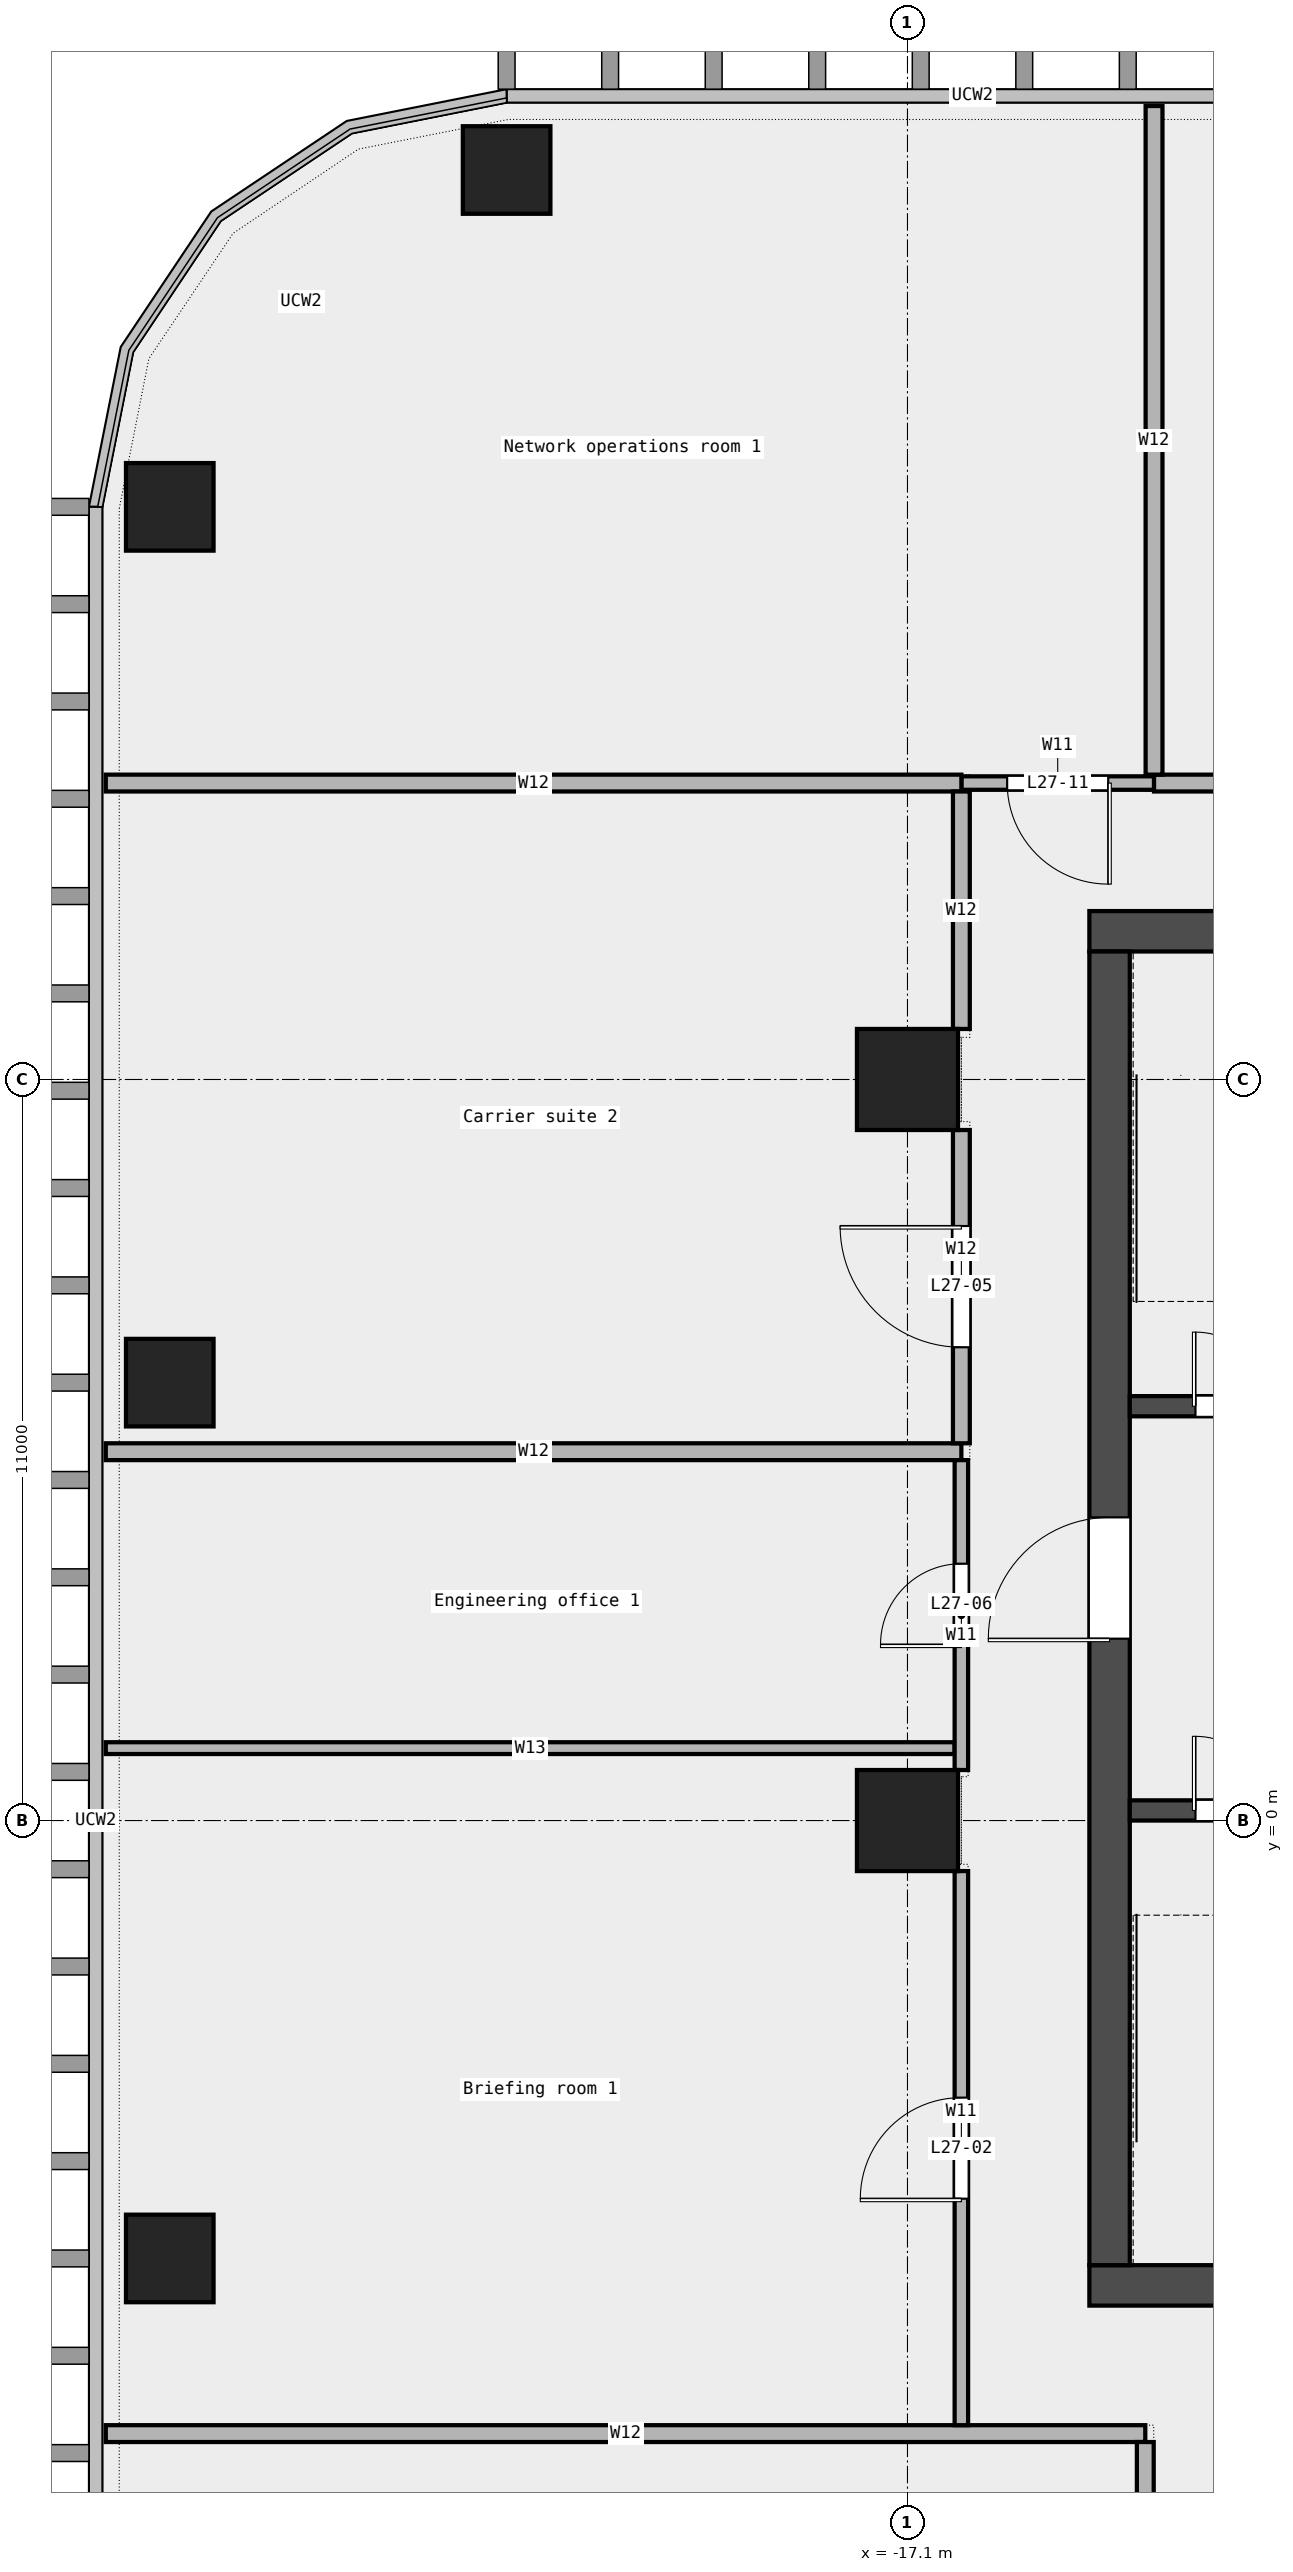
"""IFC4 building model, lengths in metres.
Left out: names, types, materials, properties, quantities, classifications, styles, units other than length and angle.
Written with IfcOpenShell. Run it as: python <this file> out.ifc"""

import sys

from ifc_helpers import new_model, si_unit, direction, frame, frame_2d, origin, origin_2d, place, context, subcontext, project, spatial, rectangle, extrude, element, fill, save


model = new_model("IFC4")
c1 = context("Model", 3, precision=1e-05, world=origin(), true_north=direction((0.0, 1.0)))
c2 = subcontext(c1, "Body", "Model", "MODEL_VIEW")
j1 = project(units=[si_unit("LENGTHUNIT", "METRE"), si_unit("PLANEANGLEUNIT", "RADIAN")], contexts=[c1])
p1 = place(None, origin())
s1 = spatial("IfcSite", under=j1, at=p1, CompositionType="ELEMENT")
p2 = place(p1, origin())
s2 = spatial("IfcBuilding", under=s1, at=p2, CompositionType="ELEMENT")
p3 = place(p2, frame((0.0, 0.0, 135.1)))
s3 = spatial("IfcBuildingStorey", under=s2, at=p3, CompositionType="ELEMENT", Elevation=135.1)
for number, where, z_axis, x_axis in (
    (1, (-23.05, 24.5, 0.0), (0.0, 0.0, 1.0), (1.0, 0.0, 0.0)),
    (2, (-28.05, 19.5, 0.0), (0.0, 0.0, 1.0), (1.0, 0.0, 0.0)),
    (3, (-28.05, 6.5, 0.0), (0.0, 0.0, 1.0), (1.0, 0.0, 0.0)),
    (4, (-28.05, -6.5, 0.0), (0.0, 0.0, 1.0), (1.0, 0.0, 0.0)),
):
    element("IfcColumn", number, at=place(p3, frame(where, z_axis=z_axis, x_axis=x_axis)), inside=s3, PredefinedType="COLUMN", context=c2, shape_type="SweptSolid", body=[
        extrude(rectangle(XDim=1.3, YDim=1.3, at=origin_2d()), origin(), (0.0, 0.0, 1.0), 4.05),
    ])
for number, where, z_axis, x_axis in (
    (5, (-17.1, 0.0, 0.0), (0.0, 0.0, 1.0), (1.0, 0.0, 0.0)),
    (6, (-17.1, 11.0, 0.0), (0.0, 0.0, 1.0), (1.0, 0.0, 0.0)),
):
    element("IfcColumn", number, at=place(p3, frame(where, z_axis=z_axis, x_axis=x_axis)), inside=s3, PredefinedType="COLUMN", context=c2, shape_type="SweptSolid", body=[
        extrude(rectangle(XDim=1.5, YDim=1.5, at=origin_2d()), origin(), (0.0, 0.0, 1.0), 4.05),
    ])
p4 = place(p3, frame((-29.0, -9.1, 0.0), z_axis=(0.0, 0.0, 1.0), x_axis=(1.0, 0.0, 0.0)))
e7 = element("IfcWall", 7, at=p4, inside=s3, PredefinedType="PARTITIONING", context=c2, shape_type="SweptSolid", body=[
    extrude(rectangle(XDim=15.43, YDim=0.25, at=frame_2d((7.715, 0.0))), origin(), (0.0, 0.0, 1.0), 4.05),
])
p5 = place(p3, frame((-29.0, 1.075, 0.0), z_axis=(0.0, 0.0, 1.0), x_axis=(1.0, 0.0, 0.0)))
e8 = element("IfcWall", 8, at=p5, inside=s3, PredefinedType="PARTITIONING", context=c2, shape_type="SweptSolid", body=[
    extrude(rectangle(XDim=12.6, YDim=0.175, at=frame_2d((6.3, 0.0))), origin(), (0.0, 0.0, 1.0), 4.05),
])
p6 = place(p3, frame((-29.0, 5.475, 0.0), z_axis=(0.0, 0.0, 1.0), x_axis=(1.0, 0.0, 0.0)))
e9 = element("IfcWall", 9, at=p6, inside=s3, PredefinedType="PARTITIONING", context=c2, shape_type="SweptSolid", body=[
    extrude(rectangle(XDim=12.7, YDim=0.25, at=frame_2d((6.35, 0.0))), origin(), (0.0, 0.0, 1.0), 4.05),
])
p7 = place(p3, frame((-16.3, 15.4, 0.0), z_axis=(0.0, 0.0, 1.0), x_axis=(1.0, 0.0, 0.0)))
e10 = element("IfcWall", 10, at=p7, inside=s3, PredefinedType="PARTITIONING", context=c2, shape_type="SweptSolid", body=[
    extrude(rectangle(XDim=2.86, YDim=0.2, at=frame_2d((1.43, 0.0))), origin(), (0.0, 0.0, 1.0), 4.05),
])
p8 = place(p7, frame((0.68, 0.0, 0.0)))
e11 = element("IfcOpeningElement", 11, at=p8, cuts=e10, PredefinedType="OPENING", context=c2, shape_type="SweptSolid", body=[
    extrude(rectangle(XDim=1.5, YDim=2.1, at=frame_2d((0.75, 1.05))), frame((0.0, 0.112, 0.0), z_axis=(0.0, -1.0, 0.0), x_axis=(1.0, 0.0, 0.0)), (0.0, 0.0, 1.0), 0.224),
])
p9 = place(p3, frame((-29.0, 15.4, 0.0), z_axis=(0.0, 0.0, 1.0), x_axis=(1.0, 0.0, 0.0)))
e12 = element("IfcWall", 12, at=p9, inside=s3, PredefinedType="PARTITIONING", context=c2, shape_type="SweptSolid", body=[
    extrude(rectangle(XDim=12.7, YDim=0.25, at=frame_2d((6.35, 0.0))), origin(), (0.0, 0.0, 1.0), 4.05),
])
p10 = place(p3, frame((-13.44, 15.4, 0.0), z_axis=(0.0, 0.0, 1.0), x_axis=(1.0, 0.0, 0.0)))
e13 = element("IfcWall", 13, at=p10, inside=s3, PredefinedType="PARTITIONING", context=c2, shape_type="SweptSolid", body=[
    extrude(rectangle(XDim=4.22, YDim=0.25, at=frame_2d((2.11, 0.0))), origin(), (0.0, 0.0, 1.0), 4.05),
])
p11 = place(p10, frame((1.66, 0.0, 0.0)))
e14 = element("IfcOpeningElement", 14, at=p11, cuts=e13, PredefinedType="OPENING", context=c2, shape_type="SweptSolid", body=[
    extrude(rectangle(XDim=0.9, YDim=2.1, at=frame_2d((0.45, 1.05))), frame((0.0, 0.137, 0.0), z_axis=(0.0, -1.0, 0.0), x_axis=(1.0, 0.0, 0.0)), (0.0, 0.0, 1.0), 0.274),
])
p12 = place(p3, frame((-16.3, -8.975, 0.0), z_axis=(0.0, 0.0, 1.0), x_axis=(0.0, 1.0, 0.0)))
e15 = element("IfcWall", 15, at=p12, inside=s3, PredefinedType="PARTITIONING", context=c2, shape_type="SweptSolid", body=[
    extrude(rectangle(XDim=8.225, YDim=0.2, at=frame_2d((4.113, 0.0))), origin(), (0.0, 0.0, 1.0), 4.05),
])
p13 = place(p12, frame((3.363, 0.0, 0.0)))
e16 = element("IfcOpeningElement", 16, at=p13, cuts=e15, PredefinedType="OPENING", context=c2, shape_type="SweptSolid", body=[
    extrude(rectangle(XDim=1.5, YDim=2.1, at=frame_2d((0.75, 1.05))), frame((0.0, 0.112, 0.0), z_axis=(0.0, -1.0, 0.0), x_axis=(1.0, 0.0, 0.0)), (0.0, 0.0, 1.0), 0.224),
])
p14 = place(p3, frame((-16.3, 0.75, 0.0), z_axis=(0.0, 0.0, 1.0), x_axis=(0.0, 1.0, 0.0)))
e17 = element("IfcWall", 17, at=p14, inside=s3, PredefinedType="PARTITIONING", context=c2, shape_type="SweptSolid", body=[
    extrude(rectangle(XDim=4.6, YDim=0.2, at=frame_2d((2.3, 0.0))), origin(), (0.0, 0.0, 1.0), 4.05),
])
p15 = place(p14, frame((1.863, 0.0, 0.0)))
e18 = element("IfcOpeningElement", 18, at=p15, cuts=e17, PredefinedType="OPENING", context=c2, shape_type="SweptSolid", body=[
    extrude(rectangle(XDim=1.2, YDim=2.1, at=frame_2d((0.6, 1.05))), frame((0.0, 0.112, 0.0), z_axis=(0.0, -1.0, 0.0), x_axis=(1.0, 0.0, 0.0)), (0.0, 0.0, 1.0), 0.224),
])
p16 = place(p3, frame((-16.3, 5.6, 0.0), z_axis=(0.0, 0.0, 1.0), x_axis=(0.0, 1.0, 0.0)))
e19 = element("IfcWall", 19, at=p16, inside=s3, PredefinedType="PARTITIONING", context=c2, shape_type="SweptSolid", body=[
    extrude(rectangle(XDim=4.65, YDim=0.25, at=frame_2d((2.325, 0.0))), origin(), (0.0, 0.0, 1.0), 4.05),
])
p17 = place(p16, frame((1.425, 0.0, 0.0)))
e20 = element("IfcOpeningElement", 20, at=p17, cuts=e19, PredefinedType="OPENING", context=c2, shape_type="SweptSolid", body=[
    extrude(rectangle(XDim=1.8, YDim=2.1, at=frame_2d((0.9, 1.05))), frame((0.0, 0.137, 0.0), z_axis=(0.0, -1.0, 0.0), x_axis=(1.0, 0.0, 0.0)), (0.0, 0.0, 1.0), 0.274),
])
p18 = place(p3, frame((-16.3, 11.75, 0.0), z_axis=(0.0, 0.0, 1.0), x_axis=(0.0, 1.0, 0.0)))
e21 = element("IfcWall", 21, at=p18, inside=s3, PredefinedType="PARTITIONING", context=c2, shape_type="SweptSolid", body=[
    extrude(rectangle(XDim=3.525, YDim=0.25, at=frame_2d((1.762, 0.0))), origin(), (0.0, 0.0, 1.0), 4.05),
])
p19 = place(p3, frame((-13.57, -13.825, 0.0), z_axis=(0.0, 0.0, 1.0), x_axis=(0.0, 1.0, 0.0)))
e22 = element("IfcWall", 22, at=p19, inside=s3, PredefinedType="PARTITIONING", context=c2, shape_type="SweptSolid", body=[
    extrude(rectangle(XDim=4.6, YDim=0.25, at=frame_2d((2.3, 0.0))), origin(), (0.0, 0.0, 1.0), 4.05),
])
p20 = place(p3, frame((-13.44, 15.525, 0.0), z_axis=(0.0, 0.0, 1.0), x_axis=(0.0, 1.0, 0.0)))
e23 = element("IfcWall", 23, at=p20, inside=s3, PredefinedType="PARTITIONING", context=c2, shape_type="SweptSolid", body=[
    extrude(rectangle(XDim=9.925, YDim=0.25, at=frame_2d((4.962, 0.0))), origin(), (0.0, 0.0, 1.0), 4.05),
])
p21 = place(p3, frame((-14.4, -6.9, 0.0), z_axis=(0.0, 0.0, 1.0), x_axis=(1.0, 0.0, 0.0)))
e24 = element("IfcWall", 24, at=p21, inside=s3, PredefinedType="SHEAR", context=c2, shape_type="SweptSolid", body=[
    extrude(rectangle(XDim=28.8, YDim=0.6, at=frame_2d((14.4, 0.0))), origin(), (0.0, 0.0, 1.0), 4.2),
])
p22 = place(p21, frame((4.9, 0.0, 0.0)))
e25 = element("IfcOpeningElement", 25, at=p22, cuts=e24, PredefinedType="OPENING", context=c2, shape_type="SweptSolid", body=[
    extrude(rectangle(XDim=1.0, YDim=2.1, at=frame_2d((0.5, 1.05))), frame((0.0, 0.312, 0.0), z_axis=(0.0, -1.0, 0.0), x_axis=(1.0, 0.0, 0.0)), (0.0, 0.0, 1.0), 0.624),
])
p23 = place(p21, frame((9.3, 0.0, 0.0)))
e26 = element("IfcOpeningElement", 26, at=p23, cuts=e24, PredefinedType="OPENING", context=c2, shape_type="SweptSolid", body=[
    extrude(rectangle(XDim=1.2, YDim=2.1, at=frame_2d((0.6, 1.05))), frame((0.0, 0.312, 0.0), z_axis=(0.0, -1.0, 0.0), x_axis=(1.0, 0.0, 0.0)), (0.0, 0.0, 1.0), 0.624),
])
p24 = place(p21, frame((14.462, 0.0, 0.0)))
e27 = element("IfcOpeningElement", 27, at=p24, cuts=e24, PredefinedType="OPENING", context=c2, shape_type="SweptSolid", body=[
    extrude(rectangle(XDim=1.0, YDim=2.1, at=frame_2d((0.5, 1.05))), frame((0.0, 0.312, 0.0), z_axis=(0.0, -1.0, 0.0), x_axis=(1.0, 0.0, 0.0)), (0.0, 0.0, 1.0), 0.624),
])
p25 = place(p21, frame((18.75, 0.0, 0.0)))
e28 = element("IfcOpeningElement", 28, at=p25, cuts=e24, PredefinedType="OPENING", context=c2, shape_type="SweptSolid", body=[
    extrude(rectangle(XDim=1.8, YDim=2.1, at=frame_2d((0.9, 1.05))), frame((0.0, 0.312, 0.0), z_axis=(0.0, -1.0, 0.0), x_axis=(1.0, 0.0, 0.0)), (0.0, 0.0, 1.0), 0.624),
])
p26 = place(p21, frame((23.087, 0.0, 0.0)))
e29 = element("IfcOpeningElement", 29, at=p26, cuts=e24, PredefinedType="OPENING", context=c2, shape_type="SweptSolid", body=[
    extrude(rectangle(XDim=1.0, YDim=2.1, at=frame_2d((0.5, 1.05))), frame((0.0, 0.312, 0.0), z_axis=(0.0, -1.0, 0.0), x_axis=(1.0, 0.0, 0.0)), (0.0, 0.0, 1.0), 0.624),
])
p27 = place(p3, frame((-14.4, 13.2, 0.0), z_axis=(0.0, 0.0, 1.0), x_axis=(1.0, 0.0, 0.0)))
e30 = element("IfcWall", 30, at=p27, inside=s3, PredefinedType="SHEAR", context=c2, shape_type="SweptSolid", body=[
    extrude(rectangle(XDim=28.8, YDim=0.6, at=frame_2d((14.4, 0.0))), origin(), (0.0, 0.0, 1.0), 4.2),
])
p28 = place(p27, frame((6.775, 0.0, 0.0)))
e31 = element("IfcOpeningElement", 31, at=p28, cuts=e30, PredefinedType="OPENING", context=c2, shape_type="SweptSolid", body=[
    extrude(rectangle(XDim=1.0, YDim=2.1, at=frame_2d((0.5, 1.05))), frame((0.0, 0.312, 0.0), z_axis=(0.0, -1.0, 0.0), x_axis=(1.0, 0.0, 0.0)), (0.0, 0.0, 1.0), 0.624),
])
p29 = place(p27, frame((13.525, 0.0, 0.0)))
e32 = element("IfcOpeningElement", 32, at=p29, cuts=e30, PredefinedType="OPENING", context=c2, shape_type="SweptSolid", body=[
    extrude(rectangle(XDim=1.0, YDim=2.1, at=frame_2d((0.5, 1.05))), frame((0.0, 0.312, 0.0), z_axis=(0.0, -1.0, 0.0), x_axis=(1.0, 0.0, 0.0)), (0.0, 0.0, 1.0), 0.624),
])
p30 = place(p27, frame((20.65, 0.0, 0.0)))
e33 = element("IfcOpeningElement", 33, at=p30, cuts=e30, PredefinedType="OPENING", context=c2, shape_type="SweptSolid", body=[
    extrude(rectangle(XDim=1.0, YDim=2.1, at=frame_2d((0.5, 1.05))), frame((0.0, 0.312, 0.0), z_axis=(0.0, -1.0, 0.0), x_axis=(1.0, 0.0, 0.0)), (0.0, 0.0, 1.0), 0.624),
])
p31 = place(p3, frame((-14.1, -6.6, 0.0), z_axis=(0.0, 0.0, 1.0), x_axis=(0.0, 1.0, 0.0)))
e34 = element("IfcWall", 34, at=p31, inside=s3, PredefinedType="SHEAR", context=c2, shape_type="SweptSolid", body=[
    extrude(rectangle(XDim=19.5, YDim=0.6, at=frame_2d((9.75, 0.0))), origin(), (0.0, 0.0, 1.0), 4.2),
])
p32 = place(p31, frame((9.3, 0.0, 0.0)))
e35 = element("IfcOpeningElement", 35, at=p32, cuts=e34, PredefinedType="OPENING", context=c2, shape_type="SweptSolid", body=[
    extrude(rectangle(XDim=1.8, YDim=2.1, at=frame_2d((0.9, 1.05))), frame((0.0, 0.312, 0.0), z_axis=(0.0, -1.0, 0.0), x_axis=(1.0, 0.0, 0.0)), (0.0, 0.0, 1.0), 0.624),
])
p33 = place(p3, frame((-13.8, 0.15, 0.0), z_axis=(0.0, 0.0, 1.0), x_axis=(1.0, 0.0, 0.0)))
e36 = element("IfcWall", 36, at=p33, inside=s3, PredefinedType="SOLIDWALL", context=c2, shape_type="SweptSolid", body=[
    extrude(rectangle(XDim=3.15, YDim=0.3, at=frame_2d((1.575, 0.0))), origin(), (0.0, 0.0, 1.0), 4.2),
])
p34 = place(p33, frame((0.975, 0.0, 0.0)))
e37 = element("IfcOpeningElement", 37, at=p34, cuts=e36, PredefinedType="OPENING", context=c2, shape_type="SweptSolid", body=[
    extrude(rectangle(XDim=1.1, YDim=2.1, at=frame_2d((0.55, 1.05))), frame((0.0, 0.162, 0.0), z_axis=(0.0, -1.0, 0.0), x_axis=(1.0, 0.0, 0.0)), (0.0, 0.0, 1.0), 0.324),
])
p35 = place(p3, frame((-13.8, 6.15, 0.0), z_axis=(0.0, 0.0, 1.0), x_axis=(1.0, 0.0, 0.0)))
e38 = element("IfcWall", 38, at=p35, inside=s3, PredefinedType="SOLIDWALL", context=c2, shape_type="SweptSolid", body=[
    extrude(rectangle(XDim=3.15, YDim=0.3, at=frame_2d((1.575, 0.0))), origin(), (0.0, 0.0, 1.0), 4.2),
])
p36 = place(p35, frame((0.975, 0.0, 0.0)))
e39 = element("IfcOpeningElement", 39, at=p36, cuts=e38, PredefinedType="OPENING", context=c2, shape_type="SweptSolid", body=[
    extrude(rectangle(XDim=1.1, YDim=2.1, at=frame_2d((0.55, 1.05))), frame((0.0, 0.162, 0.0), z_axis=(0.0, -1.0, 0.0), x_axis=(1.0, 0.0, 0.0)), (0.0, 0.0, 1.0), 0.324),
])
p37 = place(p13, origin())
e40 = element("IfcDoor", 40, at=p37, inside=s3, OperationType="DOUBLE_DOOR_SINGLE_SWING", PredefinedType="DOOR", context=c2, shape_type="SweptSolid", body=[
    extrude(rectangle(XDim=1.5, YDim=2.1, at=frame_2d((0.75, 1.05))), frame((0.0, 0.025, 0.0), z_axis=(0.0, -1.0, 0.0), x_axis=(1.0, 0.0, 0.0)), (0.0, 0.0, 1.0), 0.05),
])
fill(e16, e40)
p38 = place(p17, origin())
e41 = element("IfcDoor", 41, at=p38, inside=s3, OperationType="DOUBLE_DOOR_SINGLE_SWING", PredefinedType="DOOR", context=c2, shape_type="SweptSolid", body=[
    extrude(rectangle(XDim=1.8, YDim=2.1, at=frame_2d((0.9, 1.05))), frame((0.0, 0.025, 0.0), z_axis=(0.0, -1.0, 0.0), x_axis=(1.0, 0.0, 0.0)), (0.0, 0.0, 1.0), 0.05),
])
fill(e20, e41)
p39 = place(p15, origin())
e42 = element("IfcDoor", 42, at=p39, inside=s3, OperationType="SINGLE_SWING_LEFT", PredefinedType="DOOR", context=c2, shape_type="SweptSolid", body=[
    extrude(rectangle(XDim=1.2, YDim=2.1, at=frame_2d((0.6, 1.05))), frame((0.0, 0.025, 0.0), z_axis=(0.0, -1.0, 0.0), x_axis=(1.0, 0.0, 0.0)), (0.0, 0.0, 1.0), 0.05),
])
fill(e18, e42)
p40 = place(p8, origin())
e43 = element("IfcDoor", 43, at=p40, inside=s3, OperationType="DOUBLE_DOOR_SINGLE_SWING", PredefinedType="DOOR", context=c2, shape_type="SweptSolid", body=[
    extrude(rectangle(XDim=1.5, YDim=2.1, at=frame_2d((0.75, 1.05))), frame((0.0, 0.025, 0.0), z_axis=(0.0, -1.0, 0.0), x_axis=(1.0, 0.0, 0.0)), (0.0, 0.0, 1.0), 0.05),
])
fill(e11, e43)
p41 = place(p34, origin())
e44 = element("IfcDoor", 44, at=p41, inside=s3, OperationType="SINGLE_SWING_LEFT", PredefinedType="DOOR", context=c2, shape_type="SweptSolid", body=[
    extrude(rectangle(XDim=1.1, YDim=2.1, at=frame_2d((0.55, 1.05))), frame((0.0, 0.025, 0.0), z_axis=(0.0, -1.0, 0.0), x_axis=(1.0, 0.0, 0.0)), (0.0, 0.0, 1.0), 0.05),
])
fill(e37, e44)
p42 = place(p36, origin())
e45 = element("IfcDoor", 45, at=p42, inside=s3, OperationType="SINGLE_SWING_LEFT", PredefinedType="DOOR", context=c2, shape_type="SweptSolid", body=[
    extrude(rectangle(XDim=1.1, YDim=2.1, at=frame_2d((0.55, 1.05))), frame((0.0, 0.025, 0.0), z_axis=(0.0, -1.0, 0.0), x_axis=(1.0, 0.0, 0.0)), (0.0, 0.0, 1.0), 0.05),
])
fill(e39, e45)
p43 = place(p32, origin())
e46 = element("IfcDoor", 46, at=p43, inside=s3, OperationType="DOUBLE_DOOR_SINGLE_SWING", PredefinedType="DOOR", context=c2, shape_type="SweptSolid", body=[
    extrude(rectangle(XDim=1.8, YDim=2.1, at=frame_2d((0.9, 1.05))), frame((0.0, 0.025, 0.0), z_axis=(0.0, -1.0, 0.0), x_axis=(1.0, 0.0, 0.0)), (0.0, 0.0, 1.0), 0.05),
])
fill(e35, e46)
save(model, sys.argv[1])
